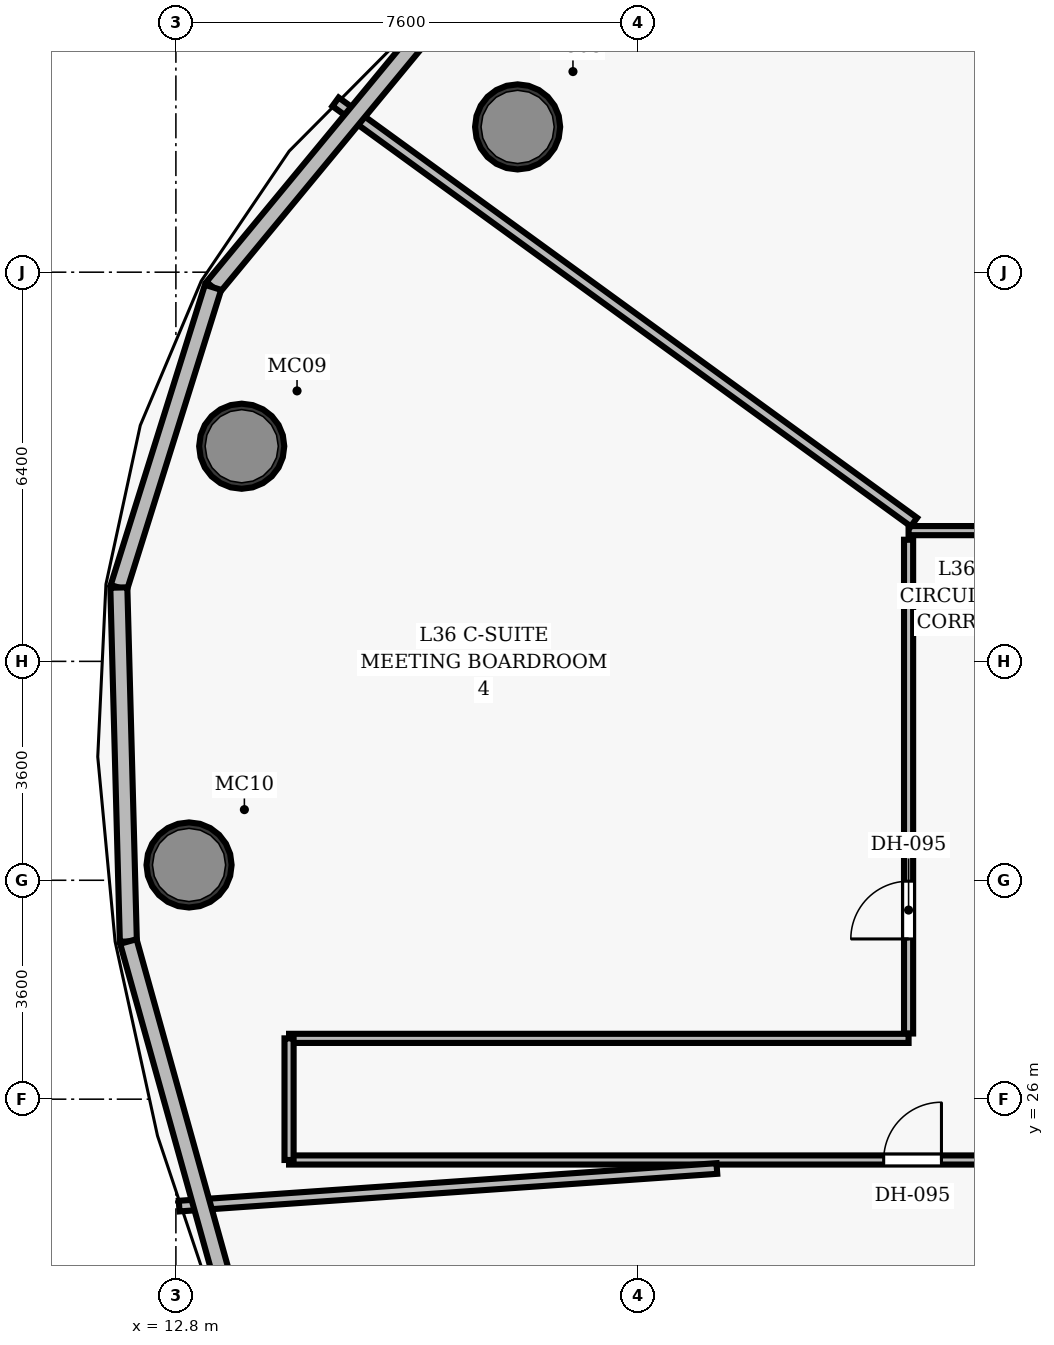
"""IFC4 building model, lengths in metres.
Left out: names, types, materials, properties, quantities, classifications, styles, units other than length and angle.
Written with IfcOpenShell. Run it as: python <this file> out.ifc"""

import sys

from ifc_helpers import new_model, si_unit, direction, frame, frame_2d, origin, origin_2d, place, context, subcontext, project, spatial, rectangle, hollow_circle, extrude, element, fill, save


model = new_model("IFC4")
c1 = context("Model", 3, precision=1e-05, world=origin(), true_north=direction((0.0, 1.0)))
c2 = subcontext(c1, "Body", "Model", "MODEL_VIEW")
j1 = project(units=[si_unit("LENGTHUNIT", "METRE"), si_unit("PLANEANGLEUNIT", "RADIAN")], contexts=[c1])
p1 = place(None, origin())
s1 = spatial("IfcSite", under=j1, at=p1, CompositionType="ELEMENT")
p2 = place(p1, origin())
s2 = spatial("IfcBuilding", under=s1, at=p2, CompositionType="ELEMENT")
p3 = place(p2, frame((0.0, 0.0, 144.8)))
s3 = spatial("IfcBuildingStorey", under=s2, at=p3, CompositionType="ELEMENT", Elevation=144.8)
for number, where, z_axis, x_axis in (
    (1, (18.42, 41.989, 0.0), (0.0, 0.0, 1.0), (1.0, 0.0, 0.0)),
    (2, (13.882, 36.738, 0.0), (0.0, 0.0, 1.0), (1.0, 0.0, 0.0)),
    (3, (13.016, 29.852, 0.0), (0.0, 0.0, 1.0), (1.0, 0.0, 0.0)),
):
    element("IfcColumn", number, at=place(p3, frame(where, z_axis=z_axis, x_axis=x_axis)), inside=s3, PredefinedType="COLUMN", context=c2, shape_type="SweptSolid", body=[
        extrude(hollow_circle(Radius=0.7, WallThickness=0.055, at=origin_2d()), origin(), (0.0, 0.0, 1.0), 3.5),
    ])
p4 = place(p3, frame((24.85, 35.35, 0.0), z_axis=(0.0, 0.0, 1.0), x_axis=(1.0, 0.0, 0.0)))
e4 = element("IfcWall", 4, at=p4, inside=s3, PredefinedType="PARTITIONING", context=c2, shape_type="SweptSolid", body=[
    extrude(rectangle(XDim=26.0, YDim=0.15, at=frame_2d((13.0, 0.0))), origin(), (0.0, 0.0, 1.0), 2.675),
])
p5 = place(p4, frame((18.854, 0.0, 0.0)))
e5 = element("IfcOpeningElement", 5, at=p5, cuts=e4, PredefinedType="OPENING", context=c2, shape_type="SweptSolid", body=[
    extrude(rectangle(XDim=1.5, YDim=2.2, at=frame_2d((0.75, 1.1))), frame((0.0, 0.085, 0.0), z_axis=(0.0, -1.0, 0.0), x_axis=(1.0, 0.0, 0.0)), (0.0, 0.0, 1.0), 0.17),
])
p6 = place(p4, frame((11.636, 0.0, 0.0)))
e6 = element("IfcOpeningElement", 6, at=p6, cuts=e4, PredefinedType="OPENING", context=c2, shape_type="SweptSolid", body=[
    extrude(rectangle(XDim=1.5, YDim=2.2, at=frame_2d((0.75, 1.1))), frame((0.0, 0.085, 0.0), z_axis=(0.0, -1.0, 0.0), x_axis=(1.0, 0.0, 0.0)), (0.0, 0.0, 1.0), 0.17),
])
p7 = place(p4, frame((6.73, 0.0, 0.0)))
e7 = element("IfcOpeningElement", 7, at=p7, cuts=e4, PredefinedType="OPENING", context=c2, shape_type="SweptSolid", body=[
    extrude(rectangle(XDim=0.95, YDim=2.15, at=frame_2d((0.475, 1.075))), frame((0.0, 0.085, 0.0), z_axis=(0.0, -1.0, 0.0), x_axis=(1.0, 0.0, 0.0)), (0.0, 0.0, 1.0), 0.17),
])
p8 = place(p3, frame((24.85, 27.08, 0.0), z_axis=(0.0, 0.0, 1.0), x_axis=(0.0, 1.0, 0.0)))
e8 = element("IfcWall", 8, at=p8, inside=s3, PredefinedType="PARTITIONING", context=c2, shape_type="SweptSolid", body=[
    extrude(rectangle(XDim=8.12, YDim=0.15, at=frame_2d((4.06, 0.0))), origin(), (0.0, 0.0, 1.0), 2.675),
])
p9 = place(p8, frame((1.555, 0.0, 0.0)))
e9 = element("IfcOpeningElement", 9, at=p9, cuts=e8, PredefinedType="OPENING", context=c2, shape_type="SweptSolid", body=[
    extrude(rectangle(XDim=0.95, YDim=2.15, at=frame_2d((0.475, 1.075))), frame((0.0, 0.085, 0.0), z_axis=(0.0, -1.0, 0.0), x_axis=(1.0, 0.0, 0.0)), (0.0, 0.0, 1.0), 0.17),
])
p10 = place(p3, frame((14.661, 27.0, 0.0), z_axis=(0.0, 0.0, 1.0), x_axis=(1.0, 0.0, 0.0)))
e10 = element("IfcWall", 10, at=p10, inside=s3, PredefinedType="PARTITIONING", context=c2, shape_type="SweptSolid", body=[
    extrude(rectangle(XDim=10.189, YDim=0.15, at=frame_2d((5.094, 0.0))), origin(), (0.0, 0.0, 1.0), 2.675),
])
p11 = place(p3, frame((14.661, 25.0, 0.0), z_axis=(0.0, 0.0, 1.0), x_axis=(1.0, 0.0, 0.0)))
e11 = element("IfcWall", 11, at=p11, inside=s3, PredefinedType="PARTITIONING", context=c2, shape_type="SweptSolid", body=[
    extrude(rectangle(XDim=12.189, YDim=0.15, at=frame_2d((6.094, 0.0))), origin(), (0.0, 0.0, 1.0), 2.675),
])
p12 = place(p11, frame((9.779, 0.0, 0.0)))
e12 = element("IfcOpeningElement", 12, at=p12, cuts=e11, PredefinedType="OPENING", context=c2, shape_type="SweptSolid", body=[
    extrude(rectangle(XDim=0.95, YDim=2.15, at=frame_2d((0.475, 1.075))), frame((0.0, 0.085, 0.0), z_axis=(0.0, -1.0, 0.0), x_axis=(1.0, 0.0, 0.0)), (0.0, 0.0, 1.0), 0.17),
])
p13 = place(p3, frame((14.661, 25.0, 0.0), z_axis=(0.0, 0.0, 1.0), x_axis=(0.0, 1.0, 0.0)))
e13 = element("IfcWall", 13, at=p13, inside=s3, PredefinedType="PARTITIONING", context=c2, shape_type="SweptSolid", body=[
    extrude(rectangle(XDim=2.0, YDim=0.15, at=frame_2d((1.0, 0.0))), origin(), (0.0, 0.0, 1.0), 2.675),
])
p14 = place(p3, frame((24.938, 35.49, 0.0), z_axis=(0.0, 0.0, 1.0), x_axis=(-0.809012550845, 0.587791368239, 0.0)))
e14 = element("IfcWall", 14, at=p14, inside=s3, PredefinedType="PARTITIONING", context=c2, shape_type="SweptSolid", body=[
    extrude(rectangle(XDim=11.758, YDim=0.175, at=frame_2d((5.879, 0.0))), origin(), (0.0, 0.0, 1.0), 2.675),
])
p15 = place(p3, frame((21.697, 24.86, 0.0), z_axis=(0.0, 0.0, 1.0), x_axis=(-0.997564105518, -0.069755683505, 0.0)))
e15 = element("IfcWall", 15, at=p15, inside=s3, PredefinedType="PARTITIONING", context=c2, shape_type="SweptSolid", body=[
    extrude(rectangle(XDim=8.865, YDim=0.175, at=frame_2d((4.433, 0.0))), origin(), (0.0, 0.0, 1.0), 2.675),
])
p16 = place(p3, frame((13.411, 39.351, 0.0), z_axis=(0.0, 0.0, 1.0), x_axis=(0.63713502478, 0.770752204148, 0.0)))
e16 = element("IfcWall", 16, at=p16, inside=s3, PredefinedType="SOLIDWALL", context=c2, shape_type="SweptSolid", body=[
    extrude(rectangle(XDim=5.175, YDim=0.28, at=frame_2d((2.587, 0.0))), origin(), (0.0, 0.0, 1.0), 3.26),
])
p17 = place(p3, frame((11.862, 34.414, 0.0), z_axis=(0.0, 0.0, 1.0), x_axis=(0.299376291463, 0.95413512466, 0.0)))
e17 = element("IfcWall", 17, at=p17, inside=s3, PredefinedType="SOLIDWALL", context=c2, shape_type="SweptSolid", body=[
    extrude(rectangle(XDim=5.174, YDim=0.28, at=frame_2d((2.587, 0.0))), origin(), (0.0, 0.0, 1.0), 3.26),
])
p18 = place(p3, frame((12.018, 28.593, 0.0), z_axis=(0.0, 0.0, 1.0), x_axis=(-0.026918642547, 0.999637627685, 0.0)))
e18 = element("IfcWall", 18, at=p18, inside=s3, PredefinedType="SOLIDWALL", context=c2, shape_type="SweptSolid", body=[
    extrude(rectangle(XDim=5.823, YDim=0.28, at=frame_2d((2.911, 0.0))), origin(), (0.0, 0.0, 1.0), 3.26),
])
p19 = place(p3, frame((13.809, 22.173, 0.0), z_axis=(0.0, 0.0, 1.0), x_axis=(-0.268682789377, 0.963228715671, 0.0)))
e19 = element("IfcWall", 19, at=p19, inside=s3, PredefinedType="SOLIDWALL", context=c2, shape_type="SweptSolid", body=[
    extrude(rectangle(XDim=6.665, YDim=0.28, at=frame_2d((3.333, 0.0))), origin(), (0.0, 0.0, 1.0), 3.26),
])
p20 = place(p9, origin())
e20 = element("IfcDoor", 20, at=p20, inside=s3, OperationType="SINGLE_SWING_LEFT", PredefinedType="DOOR", context=c2, shape_type="SweptSolid", body=[
    extrude(rectangle(XDim=0.95, YDim=2.15, at=frame_2d((0.475, 1.075))), frame((0.0, 0.025, 0.0), z_axis=(0.0, -1.0, 0.0), x_axis=(1.0, 0.0, 0.0)), (0.0, 0.0, 1.0), 0.05),
])
fill(e9, e20)
p21 = place(p12, origin())
e21 = element("IfcDoor", 21, at=p21, inside=s3, OperationType="SINGLE_SWING_RIGHT", PredefinedType="DOOR", context=c2, shape_type="SweptSolid", body=[
    extrude(rectangle(XDim=0.95, YDim=2.15, at=frame_2d((0.475, 1.075))), frame((0.0, 0.025, 0.0), z_axis=(0.0, -1.0, 0.0), x_axis=(1.0, 0.0, 0.0)), (0.0, 0.0, 1.0), 0.05),
])
fill(e12, e21)
save(model, sys.argv[1])
